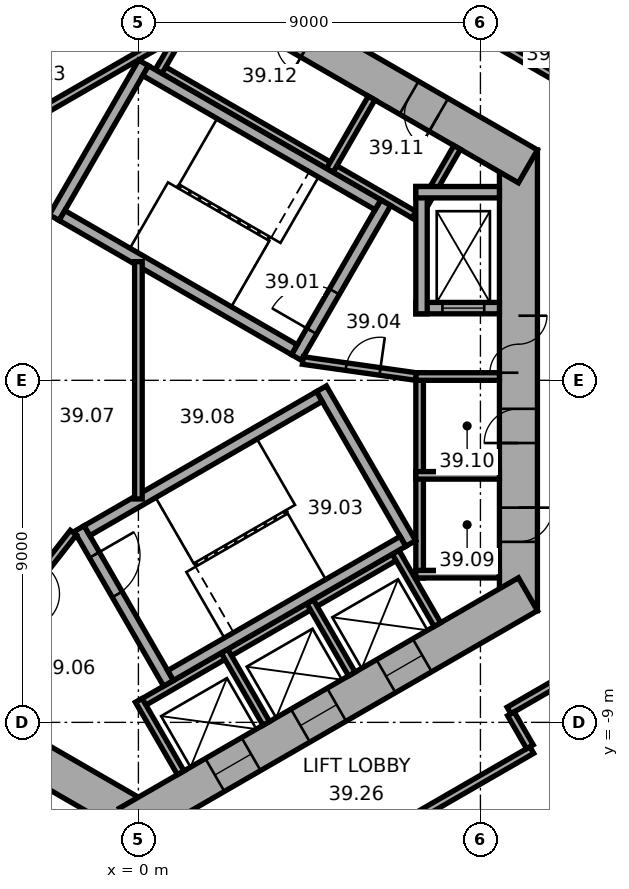
"""IFC4 building model, lengths in metres.
Left out: names, types, materials, properties, quantities, classifications, styles, units other than length and angle.
Written with IfcOpenShell. Run it as: python <this file> out.ifc"""

import sys

from ifc_helpers import new_model, si_unit, direction, frame, frame_2d, origin, place, context, subcontext, project, spatial, rectangle, extrude, element, fill, save


model = new_model("IFC4")
c1 = context("Model", 3, precision=1e-05, world=origin(), true_north=direction((0.0, 1.0)))
c2 = subcontext(c1, "Body", "Model", "MODEL_VIEW")
j1 = project(units=[si_unit("LENGTHUNIT", "METRE"), si_unit("PLANEANGLEUNIT", "RADIAN")], contexts=[c1])
p1 = place(None, origin())
s1 = spatial("IfcSite", under=j1, at=p1, CompositionType="ELEMENT")
p2 = place(p1, origin())
s2 = spatial("IfcBuilding", under=s1, at=p2, CompositionType="ELEMENT")
p3 = place(p2, frame((0.0, 0.0, 161.4)))
s3 = spatial("IfcBuildingStorey", under=s2, at=p3, CompositionType="ELEMENT", Elevation=161.4)
p4 = place(p3, frame((10.0, -6.062, 0.0), z_axis=(0.0, 0.0, 1.0), x_axis=(0.0, 1.0, 0.0)))
e1 = element("IfcWall", 1, at=p4, inside=s3, PredefinedType="SHEAR", context=c2, shape_type="SweptSolid", body=[
    extrude(rectangle(XDim=12.125, YDim=1.0, at=frame_2d((6.062, 0.0))), origin(), (0.0, 0.0, 1.0), 3.7),
])
p5 = place(p4, frame((6.262, 0.0, 0.0)))
e2 = element("IfcOpeningElement", 2, at=p5, cuts=e1, PredefinedType="OPENING", context=c2, shape_type="SweptSolid", body=[
    extrude(rectangle(XDim=1.5, YDim=2.1, at=frame_2d((0.75, 1.05))), frame((0.0, 0.51, 0.0), z_axis=(0.0, -1.0, 0.0), x_axis=(1.0, 0.0, 0.0)), (0.0, 0.0, 1.0), 1.02),
])
p6 = place(p4, frame((1.812, 0.0, 0.0)))
e3 = element("IfcOpeningElement", 3, at=p6, cuts=e1, PredefinedType="OPENING", context=c2, shape_type="SweptSolid", body=[
    extrude(rectangle(XDim=0.9, YDim=2.1, at=frame_2d((0.45, 1.05))), frame((0.0, 0.51, 0.0), z_axis=(0.0, -1.0, 0.0), x_axis=(1.0, 0.0, 0.0)), (0.0, 0.0, 1.0), 1.02),
])
p7 = place(p4, frame((4.412, 0.0, 0.0)))
e4 = element("IfcOpeningElement", 4, at=p7, cuts=e1, PredefinedType="OPENING", context=c2, shape_type="SweptSolid", body=[
    extrude(rectangle(XDim=0.9, YDim=2.1, at=frame_2d((0.45, 1.05))), frame((0.0, 0.51, 0.0), z_axis=(0.0, -1.0, 0.0), x_axis=(1.0, 0.0, 0.0)), (0.0, 0.0, 1.0), 1.02),
])
p8 = place(p3, frame((10.25, 5.629, 0.0), z_axis=(0.0, 0.0, 1.0), x_axis=(-0.866022616891, 0.50000482701, 0.0)))
e5 = element("IfcWall", 5, at=p8, inside=s3, PredefinedType="SHEAR", context=c2, shape_type="SweptSolid", body=[
    extrude(rectangle(XDim=12.125, YDim=1.0, at=frame_2d((6.062, 0.0))), origin(), (0.0, 0.0, 1.0), 3.7),
])
p9 = place(p8, frame((2.712, 0.0, 0.0)))
e6 = element("IfcOpeningElement", 6, at=p9, cuts=e5, PredefinedType="OPENING", context=c2, shape_type="SweptSolid", body=[
    extrude(rectangle(XDim=0.9, YDim=2.1, at=frame_2d((0.45, 1.05))), frame((0.0, 0.51, 0.0), z_axis=(0.0, -1.0, 0.0), x_axis=(1.0, 0.0, 0.0)), (0.0, 0.0, 1.0), 1.02),
])
p10 = place(p8, frame((6.612, 0.0, 0.0)))
e7 = element("IfcOpeningElement", 7, at=p10, cuts=e5, PredefinedType="OPENING", context=c2, shape_type="SweptSolid", body=[
    extrude(rectangle(XDim=0.9, YDim=2.1, at=frame_2d((0.45, 1.05))), frame((0.0, 0.51, 0.0), z_axis=(0.0, -1.0, 0.0), x_axis=(1.0, 0.0, 0.0)), (0.0, 0.0, 1.0), 1.02),
])
p11 = place(p3, frame((0.25, 11.691, 0.0), z_axis=(0.0, 0.0, 1.0), x_axis=(-0.866022616891, -0.50000482701, 0.0)))
e8 = element("IfcWall", 8, at=p11, inside=s3, PredefinedType="SHEAR", context=c2, shape_type="SweptSolid", body=[
    extrude(rectangle(XDim=12.125, YDim=1.0, at=frame_2d((6.062, 0.0))), origin(), (0.0, 0.0, 1.0), 3.7),
])
p12 = place(p11, frame((6.262, 0.0, 0.0)))
e9 = element("IfcOpeningElement", 9, at=p12, cuts=e8, PredefinedType="OPENING", context=c2, shape_type="SweptSolid", body=[
    extrude(rectangle(XDim=1.5, YDim=2.1, at=frame_2d((0.75, 1.05))), frame((0.0, 0.51, 0.0), z_axis=(0.0, -1.0, 0.0), x_axis=(1.0, 0.0, 0.0)), (0.0, 0.0, 1.0), 1.02),
])
p13 = place(p11, frame((3.112, 0.0, 0.0)))
e10 = element("IfcOpeningElement", 10, at=p13, cuts=e8, PredefinedType="OPENING", context=c2, shape_type="SweptSolid", body=[
    extrude(rectangle(XDim=0.9, YDim=2.1, at=frame_2d((0.45, 1.05))), frame((0.0, 0.51, 0.0), z_axis=(0.0, -1.0, 0.0), x_axis=(1.0, 0.0, 0.0)), (0.0, 0.0, 1.0), 1.02),
])
p14 = place(p3, frame((-10.25, -5.629, 0.0), z_axis=(0.0, 0.0, 1.0), x_axis=(0.866022616891, -0.50000482701, 0.0)))
e11 = element("IfcWall", 11, at=p14, inside=s3, PredefinedType="SHEAR", context=c2, shape_type="SweptSolid", body=[
    extrude(rectangle(XDim=12.125, YDim=1.0, at=frame_2d((6.062, 0.0))), origin(), (0.0, 0.0, 1.0), 3.7),
])
p15 = place(p14, frame((6.262, 0.0, 0.0)))
e12 = element("IfcOpeningElement", 12, at=p15, cuts=e11, PredefinedType="OPENING", context=c2, shape_type="SweptSolid", body=[
    extrude(rectangle(XDim=1.5, YDim=2.1, at=frame_2d((0.75, 1.05))), frame((0.0, 0.51, 0.0), z_axis=(0.0, -1.0, 0.0), x_axis=(1.0, 0.0, 0.0)), (0.0, 0.0, 1.0), 1.02),
])
p16 = place(p14, frame((1.712, 0.0, 0.0)))
e13 = element("IfcOpeningElement", 13, at=p16, cuts=e11, PredefinedType="OPENING", context=c2, shape_type="SweptSolid", body=[
    extrude(rectangle(XDim=1.1, YDim=2.1, at=frame_2d((0.55, 1.05))), frame((0.0, 0.51, 0.0), z_axis=(0.0, -1.0, 0.0), x_axis=(1.0, 0.0, 0.0)), (0.0, 0.0, 1.0), 1.02),
])
p17 = place(p14, frame((4.312, 0.0, 0.0)))
e14 = element("IfcOpeningElement", 14, at=p17, cuts=e11, PredefinedType="OPENING", context=c2, shape_type="SweptSolid", body=[
    extrude(rectangle(XDim=1.1, YDim=2.1, at=frame_2d((0.55, 1.05))), frame((0.0, 0.51, 0.0), z_axis=(0.0, -1.0, 0.0), x_axis=(1.0, 0.0, 0.0)), (0.0, 0.0, 1.0), 1.02),
])
p18 = place(p3, frame((-0.25, -11.691, 0.0), z_axis=(0.0, 0.0, 1.0), x_axis=(0.866022616891, 0.50000482701, 0.0)))
e15 = element("IfcWall", 15, at=p18, inside=s3, PredefinedType="SHEAR", context=c2, shape_type="SweptSolid", body=[
    extrude(rectangle(XDim=12.125, YDim=1.0, at=frame_2d((6.062, 0.0))), origin(), (0.0, 0.0, 1.0), 3.7),
])
p19 = place(p18, frame((2.612, 0.0, 0.0)))
e16 = element("IfcOpeningElement", 16, at=p19, cuts=e15, PredefinedType="OPENING", context=c2, shape_type="SweptSolid", body=[
    extrude(rectangle(XDim=1.1, YDim=2.1, at=frame_2d((0.55, 1.05))), frame((0.0, 0.51, 0.0), z_axis=(0.0, -1.0, 0.0), x_axis=(1.0, 0.0, 0.0)), (0.0, 0.0, 1.0), 1.02),
])
p20 = place(p18, frame((5.212, 0.0, 0.0)))
e17 = element("IfcOpeningElement", 17, at=p20, cuts=e15, PredefinedType="OPENING", context=c2, shape_type="SweptSolid", body=[
    extrude(rectangle(XDim=1.1, YDim=2.1, at=frame_2d((0.55, 1.05))), frame((0.0, 0.51, 0.0), z_axis=(0.0, -1.0, 0.0), x_axis=(1.0, 0.0, 0.0)), (0.0, 0.0, 1.0), 1.02),
])
p21 = place(p18, frame((7.812, 0.0, 0.0)))
e18 = element("IfcOpeningElement", 18, at=p21, cuts=e15, PredefinedType="OPENING", context=c2, shape_type="SweptSolid", body=[
    extrude(rectangle(XDim=1.1, YDim=2.1, at=frame_2d((0.55, 1.05))), frame((0.0, 0.51, 0.0), z_axis=(0.0, -1.0, 0.0), x_axis=(1.0, 0.0, 0.0)), (0.0, 0.0, 1.0), 1.02),
])
p22 = place(p3, frame((7.4, -5.2, 0.0), z_axis=(0.0, 0.0, 1.0), x_axis=(0.0, 1.0, 0.0)))
e19 = element("IfcWall", 19, at=p22, inside=s3, PredefinedType="PARTITIONING", context=c2, shape_type="SweptSolid", body=[
    extrude(rectangle(XDim=5.4, YDim=0.2, at=frame_2d((2.7, 0.0))), origin(), (0.0, 0.0, 1.0), 3.42),
])
for number, where, z_axis, x_axis in (
    (20, (7.3, -5.1, 0.0), (0.0, 0.0, 1.0), (1.0, 0.0, 0.0)),
    (21, (7.3, -2.5, 0.0), (0.0, 0.0, 1.0), (1.0, 0.0, 0.0)),
    (22, (7.3, 0.1, 0.0), (0.0, 0.0, 1.0), (1.0, 0.0, 0.0)),
):
    element("IfcWall", number, at=place(p3, frame(where, z_axis=z_axis, x_axis=x_axis)), inside=s3, PredefinedType="PARTITIONING", context=c2, shape_type="SweptSolid", body=[
        extrude(rectangle(XDim=2.2, YDim=0.2, at=frame_2d((1.1, 0.0))), origin(), (0.0, 0.0, 1.0), 3.42),
    ])
p23 = place(p3, frame((7.424, 4.259, 0.0), z_axis=(0.0, 0.0, 1.0), x_axis=(-0.866026010844, 0.49999894854, 0.0)))
e23 = element("IfcWall", 23, at=p23, inside=s3, PredefinedType="PARTITIONING", context=c2, shape_type="SweptSolid", body=[
    extrude(rectangle(XDim=8.0, YDim=0.2, at=frame_2d((4.0, 0.0))), origin(), (0.0, 0.0, 1.0), 3.42),
])
for number, where, z_axis, x_axis in (
    (24, (7.287, 4.222, 0.0), (0.0, 0.0, 1.0), (0.5, 0.866, 0.0)),
    (25, (5.036, 5.522, 0.0), (0.0, 0.0, 1.0), (0.5, 0.866, 0.0)),
    (26, (0.532, 8.122, 0.0), (0.0, 0.0, 1.0), (0.5, 0.866, 0.0)),
):
    element("IfcWall", number, at=place(p3, frame(where, z_axis=z_axis, x_axis=x_axis)), inside=s3, PredefinedType="PARTITIONING", context=c2, shape_type="SweptSolid", body=[
        extrude(rectangle(XDim=2.2, YDim=0.2, at=frame_2d((1.1, 0.0))), origin(), (0.0, 0.0, 1.0), 3.42),
    ])
p24 = place(p3, frame((0.803, 9.009, 0.0), z_axis=(0.0, 0.0, 1.0), x_axis=(-0.866028230842, -0.499995103361, 0.0)))
e27 = element("IfcWall", 27, at=p24, inside=s3, PredefinedType="PARTITIONING", context=c2, shape_type="SweptSolid", body=[
    extrude(rectangle(XDim=5.4, YDim=0.2, at=frame_2d((2.7, 0.0))), origin(), (0.0, 0.0, 1.0), 3.42),
])
p25 = place(p3, frame((-0.024, -8.559, 0.0), z_axis=(0.0, 0.0, 1.0), x_axis=(0.866026010844, 0.49999894854, 0.0)))
e28 = element("IfcWall", 28, at=p25, inside=s3, PredefinedType="PARTITIONING", context=c2, shape_type="SweptSolid", body=[
    extrude(rectangle(XDim=8.0, YDim=0.2, at=frame_2d((4.0, 0.0))), origin(), (0.0, 0.0, 1.0), 3.42),
])
for number, where, z_axis, x_axis in (
    (29, (0.013, -8.422, 0.0), (0.0, 0.0, 1.0), (0.5, -0.866, 0.0)),
    (30, (2.264, -7.122, 0.0), (0.0, 0.0, 1.0), (0.5, -0.866, 0.0)),
    (31, (4.516, -5.822, 0.0), (0.0, 0.0, 1.0), (0.5, -0.866, 0.0)),
    (32, (6.768, -4.522, 0.0), (0.0, 0.0, 1.0), (0.5, -0.866, 0.0)),
):
    element("IfcWall", number, at=place(p3, frame(where, z_axis=z_axis, x_axis=x_axis)), inside=s3, PredefinedType="PARTITIONING", context=c2, shape_type="SweptSolid", body=[
        extrude(rectangle(XDim=2.2, YDim=0.2, at=frame_2d((1.1, 0.0))), origin(), (0.0, 0.0, 1.0), 3.42),
    ])
p26 = place(p3, frame((4.158, 0.602, 0.0), z_axis=(0.0, 0.0, 1.0), x_axis=(0.499977259774, 0.866038532462, 0.0)))
e33 = element("IfcWall", 33, at=p26, inside=s3, PredefinedType="SHEAR", context=c2, shape_type="SweptSolid", body=[
    extrude(rectangle(XDim=4.7, YDim=0.3, at=frame_2d((2.35, 0.0))), origin(), (0.0, 0.0, 1.0), 3.42),
])
p27 = place(p26, frame((0.8, 0.0, 0.0)))
e34 = element("IfcOpeningElement", 34, at=p27, cuts=e33, PredefinedType="OPENING", context=c2, shape_type="SweptSolid", body=[
    extrude(rectangle(XDim=1.2, YDim=2.1, at=frame_2d((0.6, 1.05))), frame((0.0, 0.16, 0.0), z_axis=(0.0, -1.0, 0.0), x_axis=(1.0, 0.0, 0.0)), (0.0, 0.0, 1.0), 0.32),
])
p28 = place(p3, frame((-2.216, 4.282, 0.0), z_axis=(0.0, 0.0, 1.0), x_axis=(0.499977259774, 0.866038532462, 0.0)))
e35 = element("IfcWall", 35, at=p28, inside=s3, PredefinedType="SHEAR", context=c2, shape_type="SweptSolid", body=[
    extrude(rectangle(XDim=4.7, YDim=0.3, at=frame_2d((2.35, 0.0))), origin(), (0.0, 0.0, 1.0), 3.42),
])
for number, where, z_axis, x_axis in (
    (36, (4.103, 0.807, 0.0), (0.0, 0.0, 1.0), (-0.866, 0.5, 0.0)),
    (37, (6.303, 4.617, 0.0), (0.0, 0.0, 1.0), (-0.866, 0.5, 0.0)),
):
    element("IfcWall", number, at=place(p3, frame(where, z_axis=z_axis, x_axis=x_axis)), inside=s3, PredefinedType="SHEAR", context=c2, shape_type="SweptSolid", body=[
        extrude(rectangle(XDim=7.06, YDim=0.3, at=frame_2d((3.53, 0.0))), origin(), (0.0, 0.0, 1.0), 3.42),
    ])
p29 = place(p3, frame((-1.558, -3.902, 0.0), z_axis=(0.0, 0.0, 1.0), x_axis=(0.499977259774, -0.866038532462, 0.0)))
e38 = element("IfcWall", 38, at=p29, inside=s3, PredefinedType="SHEAR", context=c2, shape_type="SweptSolid", body=[
    extrude(rectangle(XDim=4.7, YDim=0.3, at=frame_2d((2.35, 0.0))), origin(), (0.0, 0.0, 1.0), 3.42),
])
p30 = place(p29, frame((0.8, 0.0, 0.0)))
e39 = element("IfcOpeningElement", 39, at=p30, cuts=e38, PredefinedType="OPENING", context=c2, shape_type="SweptSolid", body=[
    extrude(rectangle(XDim=1.2, YDim=2.1, at=frame_2d((0.6, 1.05))), frame((0.0, 0.16, 0.0), z_axis=(0.0, -1.0, 0.0), x_axis=(1.0, 0.0, 0.0)), (0.0, 0.0, 1.0), 0.32),
])
p31 = place(p3, frame((4.816, -0.222, 0.0), z_axis=(0.0, 0.0, 1.0), x_axis=(0.499977259774, -0.866038532462, 0.0)))
e40 = element("IfcWall", 40, at=p31, inside=s3, PredefinedType="SHEAR", context=c2, shape_type="SweptSolid", body=[
    extrude(rectangle(XDim=4.7, YDim=0.3, at=frame_2d((2.35, 0.0))), origin(), (0.0, 0.0, 1.0), 3.42),
])
for number, where, z_axis, x_axis in (
    (41, (-1.353, -3.957, 0.0), (0.0, 0.0, 1.0), (0.866, 0.5, 0.0)),
    (42, (0.847, -7.767, 0.0), (0.0, 0.0, 1.0), (0.866, 0.5, 0.0)),
):
    element("IfcWall", number, at=place(p3, frame(where, z_axis=z_axis, x_axis=x_axis)), inside=s3, PredefinedType="SHEAR", context=c2, shape_type="SweptSolid", body=[
        extrude(rectangle(XDim=7.06, YDim=0.3, at=frame_2d((3.53, 0.0))), origin(), (0.0, 0.0, 1.0), 3.42),
    ])
p32 = place(p3, frame((7.3, 1.9, 0.0), z_axis=(0.0, 0.0, 1.0), x_axis=(1.0, 0.0, 0.0)))
e43 = element("IfcWall", 43, at=p32, inside=s3, PredefinedType="SHEAR", context=c2, shape_type="SweptSolid", body=[
    extrude(rectangle(XDim=2.2, YDim=0.3, at=frame_2d((1.1, 0.0))), origin(), (0.0, 0.0, 1.0), 3.42),
])
p33 = place(p32, frame((0.7, 0.0, 0.0)))
e44 = element("IfcOpeningElement", 44, at=p33, cuts=e43, PredefinedType="OPENING", context=c2, shape_type="SweptSolid", body=[
    extrude(rectangle(XDim=1.1, YDim=2.1, at=frame_2d((0.55, 1.05))), frame((0.0, 0.16, 0.0), z_axis=(0.0, -1.0, 0.0), x_axis=(1.0, 0.0, 0.0)), (0.0, 0.0, 1.0), 0.32),
])
p34 = place(p3, frame((7.45, 1.75, 0.0), z_axis=(0.0, 0.0, 1.0), x_axis=(0.0, 1.0, 0.0)))
e45 = element("IfcWall", 45, at=p34, inside=s3, PredefinedType="SHEAR", context=c2, shape_type="SweptSolid", body=[
    extrude(rectangle(XDim=3.35, YDim=0.3, at=frame_2d((1.675, 0.0))), origin(), (0.0, 0.0, 1.0), 3.42),
])
p35 = place(p3, frame((7.3, 4.95, 0.0), z_axis=(0.0, 0.0, 1.0), x_axis=(1.0, 0.0, 0.0)))
e46 = element("IfcWall", 46, at=p35, inside=s3, PredefinedType="SHEAR", context=c2, shape_type="SweptSolid", body=[
    extrude(rectangle(XDim=2.2, YDim=0.3, at=frame_2d((1.1, 0.0))), origin(), (0.0, 0.0, 1.0), 3.42),
])
p36 = place(p3, frame((4.327, 0.521, 0.0), z_axis=(0.0, 0.0, 1.0), x_axis=(0.990124376366, -0.14019172346, 0.0)))
e47 = element("IfcWall", 47, at=p36, inside=s3, PredefinedType="PARTITIONING", context=c2, shape_type="SweptSolid", body=[
    extrude(rectangle(XDim=3.002, YDim=0.2, at=frame_2d((1.501, 0.0))), origin(), (0.0, 0.0, 1.0), 3.42),
])
p37 = place(p36, frame((1.15, 0.0, 0.0)))
e48 = element("IfcOpeningElement", 48, at=p37, cuts=e47, PredefinedType="OPENING", context=c2, shape_type="SweptSolid", body=[
    extrude(rectangle(XDim=0.9, YDim=2.1, at=frame_2d((0.45, 1.05))), frame((0.0, 0.11, 0.0), z_axis=(0.0, -1.0, 0.0), x_axis=(1.0, 0.0, 0.0)), (0.0, 0.0, 1.0), 0.22),
])
p38 = place(p3, frame((-1.712, -4.008, 0.0), z_axis=(0.0, 0.0, 1.0), x_axis=(-0.616549420702, -0.787316208287, 0.0)))
e49 = element("IfcWall", 49, at=p38, inside=s3, PredefinedType="PARTITIONING", context=c2, shape_type="SweptSolid", body=[
    extrude(rectangle(XDim=3.002, YDim=0.2, at=frame_2d((1.501, 0.0))), origin(), (0.0, 0.0, 1.0), 3.42),
])
p39 = place(p38, frame((1.15, 0.0, 0.0)))
e50 = element("IfcOpeningElement", 50, at=p39, cuts=e49, PredefinedType="OPENING", context=c2, shape_type="SweptSolid", body=[
    extrude(rectangle(XDim=0.9, YDim=2.1, at=frame_2d((0.45, 1.05))), frame((0.0, 0.11, 0.0), z_axis=(0.0, -1.0, 0.0), x_axis=(1.0, 0.0, 0.0)), (0.0, 0.0, 1.0), 0.22),
])
p40 = place(p3, frame((0.0, -3.122, 0.0), z_axis=(0.0, 0.0, 1.0), x_axis=(0.0, 1.0, 0.0)))
e51 = element("IfcWall", 51, at=p40, inside=s3, PredefinedType="PARTITIONING", context=c2, shape_type="SweptSolid", body=[
    extrude(rectangle(XDim=6.245, YDim=0.2, at=frame_2d((3.122, 0.0))), origin(), (0.0, 0.0, 1.0), 3.42),
])
p41 = place(p3, frame((2.816, -14.079, 0.0), z_axis=(0.0, 0.0, 1.0), x_axis=(0.866021128829, 0.500007404367, 0.0)))
e52 = element("IfcWall", 52, at=p41, inside=s3, PredefinedType="PARTITIONING", context=c2, shape_type="SweptSolid", body=[
    extrude(rectangle(XDim=8.702, YDim=0.2, at=frame_2d((4.351, 0.0))), origin(), (0.0, 0.0, 1.0), 3.42),
])
p42 = place(p41, frame((0.833, 0.0, 0.0)))
e53 = element("IfcOpeningElement", 53, at=p42, cuts=e52, PredefinedType="OPENING", context=c2, shape_type="SweptSolid", body=[
    extrude(rectangle(XDim=1.0, YDim=2.1, at=frame_2d((0.5, 1.05))), frame((0.0, 0.11, 0.0), z_axis=(0.0, -1.0, 0.0), x_axis=(1.0, 0.0, 0.0)), (0.0, 0.0, 1.0), 0.22),
])
p43 = place(p3, frame((9.752, -8.688, 0.0), z_axis=(0.0, 0.0, 1.0), x_axis=(0.865974105138, 0.500088841337, 0.0)))
e54 = element("IfcWall", 54, at=p43, inside=s3, PredefinedType="PARTITIONING", context=c2, shape_type="SweptSolid", body=[
    extrude(rectangle(XDim=1.961, YDim=0.2, at=frame_2d((0.98, 0.0))), origin(), (0.0, 0.0, 1.0), 3.42),
])
p44 = place(p3, frame((10.302, -9.642, 0.0), z_axis=(0.0, 0.0, 1.0), x_axis=(-0.500074377092, 0.865982457891, 0.0)))
e55 = element("IfcWall", 55, at=p44, inside=s3, PredefinedType="PARTITIONING", context=c2, shape_type="SweptSolid", body=[
    extrude(rectangle(XDim=1.001, YDim=0.2, at=frame_2d((0.5, 0.0))), origin(), (0.0, 0.0, 1.0), 3.42),
])
p45 = place(p3, frame((11.233, 7.833, 0.0), z_axis=(0.0, 0.0, 1.0), x_axis=(-0.866008176907, 0.50002983664, 0.0)))
e56 = element("IfcWall", 56, at=p45, inside=s3, PredefinedType="PARTITIONING", context=c2, shape_type="SweptSolid", body=[
    extrude(rectangle(XDim=2.2, YDim=0.2, at=frame_2d((1.1, 0.0))), origin(), (0.0, 0.0, 1.0), 3.42),
])
p46 = place(p5, origin())
e57 = element("IfcDoor", 57, at=p46, inside=s3, OperationType="DOUBLE_DOOR_SINGLE_SWING", PredefinedType="DOOR", context=c2, shape_type="SweptSolid", body=[
    extrude(rectangle(XDim=1.5, YDim=2.1, at=frame_2d((0.75, 1.05))), frame((0.0, 0.025, 0.0), z_axis=(0.0, -1.0, 0.0), x_axis=(1.0, 0.0, 0.0)), (0.0, 0.0, 1.0), 0.05),
])
fill(e2, e57)
p47 = place(p27, origin())
e58 = element("IfcDoor", 58, at=p47, inside=s3, OperationType="SINGLE_SWING_RIGHT", PredefinedType="DOOR", context=c2, shape_type="SweptSolid", body=[
    extrude(rectangle(XDim=1.2, YDim=2.1, at=frame_2d((0.6, 1.05))), frame((0.0, 0.025, 0.0), z_axis=(0.0, -1.0, 0.0), x_axis=(1.0, 0.0, 0.0)), (0.0, 0.0, 1.0), 0.05),
])
fill(e34, e58)
p48 = place(p30, origin())
e59 = element("IfcDoor", 59, at=p48, inside=s3, OperationType="SINGLE_SWING_RIGHT", PredefinedType="DOOR", context=c2, shape_type="SweptSolid", body=[
    extrude(rectangle(XDim=1.2, YDim=2.1, at=frame_2d((0.6, 1.05))), frame((0.0, 0.025, 0.0), z_axis=(0.0, -1.0, 0.0), x_axis=(1.0, 0.0, 0.0)), (0.0, 0.0, 1.0), 0.05),
])
fill(e39, e59)
p49 = place(p37, origin())
e60 = element("IfcDoor", 60, at=p49, inside=s3, OperationType="SINGLE_SWING_LEFT", PredefinedType="DOOR", context=c2, shape_type="SweptSolid", body=[
    extrude(rectangle(XDim=0.9, YDim=2.1, at=frame_2d((0.45, 1.05))), frame((0.0, 0.025, 0.0), z_axis=(0.0, -1.0, 0.0), x_axis=(1.0, 0.0, 0.0)), (0.0, 0.0, 1.0), 0.05),
])
fill(e48, e60)
p50 = place(p6, origin())
e61 = element("IfcDoor", 61, at=p50, inside=s3, OperationType="SINGLE_SWING_LEFT", PredefinedType="DOOR", context=c2, shape_type="SweptSolid", body=[
    extrude(rectangle(XDim=0.9, YDim=2.1, at=frame_2d((0.45, 1.05))), frame((0.0, 0.025, 0.0), z_axis=(0.0, -1.0, 0.0), x_axis=(1.0, 0.0, 0.0)), (0.0, 0.0, 1.0), 0.05),
])
fill(e3, e61)
p51 = place(p7, origin())
e62 = element("IfcDoor", 62, at=p51, inside=s3, OperationType="SINGLE_SWING_LEFT", PredefinedType="DOOR", context=c2, shape_type="SweptSolid", body=[
    extrude(rectangle(XDim=0.9, YDim=2.1, at=frame_2d((0.45, 1.05))), frame((0.0, 0.025, 0.0), z_axis=(0.0, -1.0, 0.0), x_axis=(1.0, 0.0, 0.0)), (0.0, 0.0, 1.0), 0.05),
])
fill(e4, e62)
p52 = place(p9, origin())
e63 = element("IfcDoor", 63, at=p52, inside=s3, OperationType="SINGLE_SWING_LEFT", PredefinedType="DOOR", context=c2, shape_type="SweptSolid", body=[
    extrude(rectangle(XDim=0.9, YDim=2.1, at=frame_2d((0.45, 1.05))), frame((0.0, 0.025, 0.0), z_axis=(0.0, -1.0, 0.0), x_axis=(1.0, 0.0, 0.0)), (0.0, 0.0, 1.0), 0.05),
])
fill(e6, e63)
p53 = place(p33, origin())
e64 = element("IfcDoor", 64, at=p53, inside=s3, OperationType="DOUBLE_DOOR_SLIDING", PredefinedType="DOOR", context=c2, shape_type="SweptSolid", body=[
    extrude(rectangle(XDim=1.1, YDim=2.1, at=frame_2d((0.55, 1.05))), frame((0.0, 0.025, 0.0), z_axis=(0.0, -1.0, 0.0), x_axis=(1.0, 0.0, 0.0)), (0.0, 0.0, 1.0), 0.05),
])
fill(e44, e64)
p54 = place(p19, origin())
e65 = element("IfcDoor", 65, at=p54, inside=s3, OperationType="DOUBLE_DOOR_SLIDING", PredefinedType="DOOR", context=c2, shape_type="SweptSolid", body=[
    extrude(rectangle(XDim=1.1, YDim=2.1, at=frame_2d((0.55, 1.05))), frame((0.0, 0.025, 0.0), z_axis=(0.0, -1.0, 0.0), x_axis=(1.0, 0.0, 0.0)), (0.0, 0.0, 1.0), 0.05),
])
fill(e16, e65)
p55 = place(p20, origin())
e66 = element("IfcDoor", 66, at=p55, inside=s3, OperationType="DOUBLE_DOOR_SLIDING", PredefinedType="DOOR", context=c2, shape_type="SweptSolid", body=[
    extrude(rectangle(XDim=1.1, YDim=2.1, at=frame_2d((0.55, 1.05))), frame((0.0, 0.025, 0.0), z_axis=(0.0, -1.0, 0.0), x_axis=(1.0, 0.0, 0.0)), (0.0, 0.0, 1.0), 0.05),
])
fill(e17, e66)
p56 = place(p21, origin())
e67 = element("IfcDoor", 67, at=p56, inside=s3, OperationType="DOUBLE_DOOR_SLIDING", PredefinedType="DOOR", context=c2, shape_type="SweptSolid", body=[
    extrude(rectangle(XDim=1.1, YDim=2.1, at=frame_2d((0.55, 1.05))), frame((0.0, 0.025, 0.0), z_axis=(0.0, -1.0, 0.0), x_axis=(1.0, 0.0, 0.0)), (0.0, 0.0, 1.0), 0.05),
])
fill(e18, e67)
save(model, sys.argv[1])
